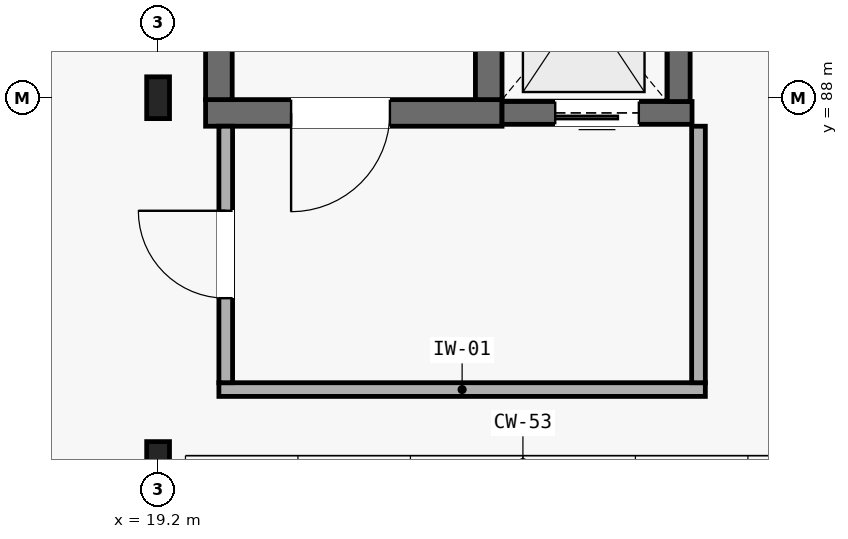
"""IFC4 building model, lengths in metres.
Left out: names, types, materials, properties, quantities, classifications, styles, units other than length and angle.
Written with IfcOpenShell. Run it as: python <this file> out.ifc"""

import sys

from ifc_helpers import new_model, si_unit, direction, frame, frame_2d, origin, origin_2d, place, context, subcontext, project, spatial, rectangle, i_section, extrude, element, fill, save


model = new_model("IFC4")
c1 = context("Model", 3, precision=1e-05, world=origin(), true_north=direction((0.0, 1.0)))
c2 = subcontext(c1, "Body", "Model", "MODEL_VIEW")
j1 = project(units=[si_unit("LENGTHUNIT", "METRE"), si_unit("PLANEANGLEUNIT", "RADIAN")], contexts=[c1])
p1 = place(None, origin())
s1 = spatial("IfcSite", under=j1, at=p1, CompositionType="ELEMENT")
p2 = place(p1, origin())
s2 = spatial("IfcBuilding", under=s1, at=p2, CompositionType="ELEMENT")
p3 = place(p2, frame((0.0, 0.0, 13.65)))
s3 = spatial("IfcBuildingStorey", under=s2, at=p3, CompositionType="ELEMENT", Elevation=13.65)
for number, where, z_axis, x_axis in (
    (1, (19.2, 83.2, 0.0), (0.0, 0.0, 1.0), (1.0, 0.0, 0.0)),
    (2, (19.2, 88.0, 0.0), (0.0, 0.0, 1.0), (1.0, 0.0, 0.0)),
):
    element("IfcColumn", number, at=place(p3, frame(where, z_axis=z_axis, x_axis=x_axis)), inside=s3, PredefinedType="COLUMN", context=c2, shape_type="SweptSolid", body=[
        extrude(i_section(OverallWidth=0.3, OverallDepth=0.55, WebThickness=0.015, FlangeThickness=0.029, FilletRadius=0.027, at=origin_2d()), origin(), (0.0, 0.0, 1.0), 4.2),
    ])
p4 = place(p3, frame((19.825, 87.8, 0.0), z_axis=(0.0, 0.0, 1.0), x_axis=(1.0, 0.0, 0.0)))
e3 = element("IfcWall", 3, at=p4, inside=s3, PredefinedType="SHEAR", context=c2, shape_type="SweptSolid", body=[
    extrude(rectangle(XDim=3.9, YDim=0.35, at=frame_2d((1.95, 0.0))), origin(), (0.0, 0.0, 1.0), 3.98),
])
p5 = place(p4, frame((1.125, 0.0, 0.0)))
e4 = element("IfcOpeningElement", 4, at=p5, cuts=e3, PredefinedType="OPENING", context=c2, shape_type="SweptSolid", body=[
    extrude(rectangle(XDim=1.3, YDim=2.15, at=frame_2d((0.65, 1.075))), frame((0.0, 0.185, 0.0), z_axis=(0.0, -1.0, 0.0), x_axis=(1.0, 0.0, 0.0)), (0.0, 0.0, 1.0), 0.37),
])
for number, where, z_axis, x_axis in (
    (5, (20.0, 87.975, 0.0), (0.0, 0.0, 1.0), (0.0, 1.0, 0.0)),
    (6, (23.55, 87.975, 0.0), (0.0, 0.0, 1.0), (0.0, 1.0, 0.0)),
):
    element("IfcWall", number, at=place(p3, frame(where, z_axis=z_axis, x_axis=x_axis)), inside=s3, PredefinedType="SHEAR", context=c2, shape_type="SweptSolid", body=[
        extrude(rectangle(XDim=7.6, YDim=0.35, at=frame_2d((3.8, 0.0))), origin(), (0.0, 0.0, 1.0), 3.98),
    ])
p6 = place(p3, frame((23.725, 87.8, 0.0), z_axis=(0.0, 0.0, 1.0), x_axis=(1.0, 0.0, 0.0)))
e7 = element("IfcWall", 7, at=p6, inside=s3, PredefinedType="SHEAR", context=c2, shape_type="SweptSolid", body=[
    extrude(rectangle(XDim=2.5, YDim=0.3, at=frame_2d((1.25, 0.0))), origin(), (0.0, 0.0, 1.0), 3.98),
])
p7 = place(p6, frame((0.7, 0.0, 0.0)))
e8 = element("IfcOpeningElement", 8, at=p7, cuts=e7, PredefinedType="OPENING", context=c2, shape_type="SweptSolid", body=[
    extrude(rectangle(XDim=1.1, YDim=2.1, at=frame_2d((0.55, 1.05))), frame((0.0, 0.16, 0.0), z_axis=(0.0, -1.0, 0.0), x_axis=(1.0, 0.0, 0.0)), (0.0, 0.0, 1.0), 0.32),
])
p8 = place(p3, frame((26.05, 87.95, 0.0), z_axis=(0.0, 0.0, 1.0), x_axis=(0.0, 1.0, 0.0)))
e9 = element("IfcWall", 9, at=p8, inside=s3, PredefinedType="SHEAR", context=c2, shape_type="SweptSolid", body=[
    extrude(rectangle(XDim=2.65, YDim=0.3, at=frame_2d((1.325, 0.0))), origin(), (0.0, 0.0, 1.0), 3.98),
])
p9 = place(p3, frame((20.0, 84.16, 0.0), z_axis=(0.0, 0.0, 1.0), x_axis=(1.0, 0.0, 0.0)))
e10 = element("IfcWall", 10, at=p9, inside=s3, PredefinedType="PARTITIONING", context=c2, shape_type="SweptSolid", body=[
    extrude(rectangle(XDim=6.4, YDim=0.18, at=frame_2d((3.2, 0.0))), origin(), (0.0, 0.0, 1.0), 3.98),
])
p10 = place(p3, frame((20.09, 84.25, 0.0), z_axis=(0.0, 0.0, 1.0), x_axis=(0.0, 1.0, 0.0)))
e11 = element("IfcWall", 11, at=p10, inside=s3, PredefinedType="PARTITIONING", context=c2, shape_type="SweptSolid", body=[
    extrude(rectangle(XDim=3.375, YDim=0.18, at=frame_2d((1.688, 0.0))), origin(), (0.0, 0.0, 1.0), 3.98),
])
p11 = place(p10, frame((1.113, 0.0, 0.0)))
e12 = element("IfcOpeningElement", 12, at=p11, cuts=e11, PredefinedType="OPENING", context=c2, shape_type="SweptSolid", body=[
    extrude(rectangle(XDim=1.15, YDim=2.15, at=frame_2d((0.575, 1.075))), frame((0.0, 0.1, 0.0), z_axis=(0.0, -1.0, 0.0), x_axis=(1.0, 0.0, 0.0)), (0.0, 0.0, 1.0), 0.2),
])
p12 = place(p3, frame((26.31, 84.25, 0.0), z_axis=(0.0, 0.0, 1.0), x_axis=(0.0, 1.0, 0.0)))
e13 = element("IfcWall", 13, at=p12, inside=s3, PredefinedType="PARTITIONING", context=c2, shape_type="SweptSolid", body=[
    extrude(rectangle(XDim=3.375, YDim=0.18, at=frame_2d((1.688, 0.0))), origin(), (0.0, 0.0, 1.0), 3.98),
])
p13 = place(p5, frame((1.3, 0.0, 0.0), z_axis=(0.0, 0.0, 1.0), x_axis=(-1.0, 0.0, 0.0)))
e14 = element("IfcDoor", 14, at=p13, inside=s3, OperationType="SINGLE_SWING_LEFT", PredefinedType="DOOR", context=c2, shape_type="SweptSolid", body=[
    extrude(rectangle(XDim=1.3, YDim=2.15, at=frame_2d((0.65, 1.075))), frame((0.0, 0.025, 0.0), z_axis=(0.0, -1.0, 0.0), x_axis=(1.0, 0.0, 0.0)), (0.0, 0.0, 1.0), 0.05),
])
fill(e4, e14)
p14 = place(p7, frame((1.1, 0.0, 0.0), z_axis=(0.0, 0.0, 1.0), x_axis=(-1.0, 0.0, 0.0)))
e15 = element("IfcDoor", 15, at=p14, inside=s3, OperationType="SLIDING_TO_LEFT", PredefinedType="DOOR", context=c2, shape_type="SweptSolid", body=[
    extrude(rectangle(XDim=1.1, YDim=2.1, at=frame_2d((0.55, 1.05))), frame((0.0, 0.025, 0.0), z_axis=(0.0, -1.0, 0.0), x_axis=(1.0, 0.0, 0.0)), (0.0, 0.0, 1.0), 0.05),
])
fill(e8, e15)
p15 = place(p11, origin())
e16 = element("IfcDoor", 16, at=p15, inside=s3, OperationType="SINGLE_SWING_RIGHT", PredefinedType="DOOR", context=c2, shape_type="SweptSolid", body=[
    extrude(rectangle(XDim=1.15, YDim=2.15, at=frame_2d((0.575, 1.075))), frame((0.0, 0.025, 0.0), z_axis=(0.0, -1.0, 0.0), x_axis=(1.0, 0.0, 0.0)), (0.0, 0.0, 1.0), 0.05),
])
fill(e12, e16)
save(model, sys.argv[1])
